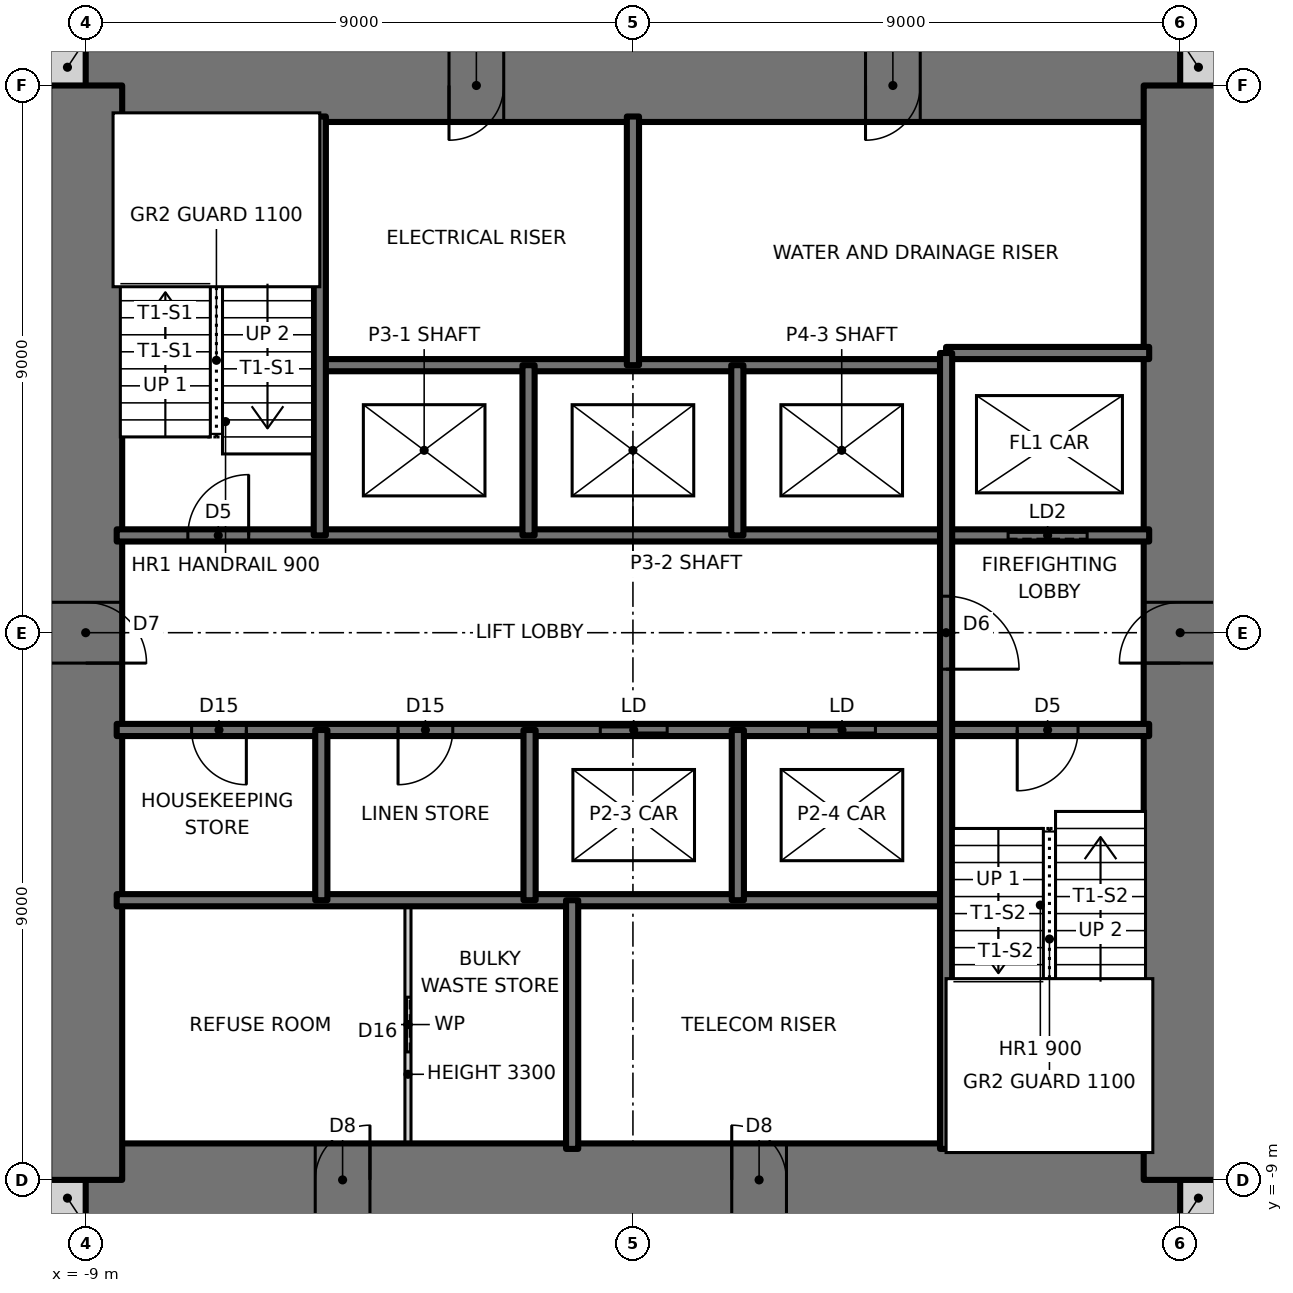
"""IFC4 building model, lengths in metres.
Left out: names, types, materials, properties, quantities, classifications, styles, units other than length and angle.
Written with IfcOpenShell. Run it as: python <this file> out.ifc"""

import sys

from ifc_helpers import new_model, si_unit, direction, frame, frame_2d, origin, place, context, subcontext, project, spatial, rectangle, extrude, element, fill, save


model = new_model("IFC4")
c1 = context("Model", 3, precision=1e-05, world=origin(), true_north=direction((0.0, 1.0)))
c2 = subcontext(c1, "Body", "Model", "MODEL_VIEW")
j1 = project(units=[si_unit("LENGTHUNIT", "METRE"), si_unit("PLANEANGLEUNIT", "RADIAN")], contexts=[c1])
p1 = place(None, origin())
s1 = spatial("IfcSite", under=j1, at=p1, CompositionType="ELEMENT")
p2 = place(p1, origin())
s2 = spatial("IfcBuilding", under=s1, at=p2, CompositionType="ELEMENT")
p3 = place(p2, frame((0.0, 0.0, 101.5)))
s3 = spatial("IfcBuildingStorey", under=s2, at=p3, CompositionType="ELEMENT", Elevation=101.5)
for number, where, z_axis, x_axis in (
    (1, (-9.6, -9.3, 0.0), (0.0, 0.0, 1.0), (1.0, 0.0, 0.0)),
    (2, (9.0, -9.3, 0.0), (0.0, 0.0, 1.0), (1.0, 0.0, 0.0)),
    (3, (9.0, 9.3, 0.0), (0.0, 0.0, 1.0), (1.0, 0.0, 0.0)),
    (4, (-9.6, 9.3, 0.0), (0.0, 0.0, 1.0), (1.0, 0.0, 0.0)),
):
    element("IfcWall", number, at=place(p3, frame(where, z_axis=z_axis, x_axis=x_axis)), inside=s3, PredefinedType="SOLIDWALL", context=c2, shape_type="SweptSolid", body=[
        extrude(rectangle(XDim=0.6, YDim=0.6, at=frame_2d((0.3, 0.0))), origin(), (0.0, 0.0, 1.0), 3.5),
    ])
p4 = place(p3, frame((-9.0, -9.0, 0.0), z_axis=(0.0, 0.0, 1.0), x_axis=(1.0, 0.0, 0.0)))
e5 = element("IfcWall", 5, at=p4, inside=s3, PredefinedType="SHEAR", context=c2, shape_type="SweptSolid", body=[
    extrude(rectangle(XDim=18.0, YDim=1.2, at=frame_2d((9.0, 0.0))), origin(), (0.0, 0.0, 1.0), 3.5),
])
p5 = place(p4, frame((3.775, 0.0, 0.0)))
e6 = element("IfcOpeningElement", 6, at=p5, cuts=e5, PredefinedType="OPENING", context=c2, shape_type="SweptSolid", body=[
    extrude(rectangle(XDim=0.9, YDim=2.1, at=frame_2d((0.45, 1.05))), frame((0.0, 0.61, 0.0), z_axis=(0.0, -1.0, 0.0), x_axis=(1.0, 0.0, 0.0)), (0.0, 0.0, 1.0), 1.22),
])
p6 = place(p4, frame((10.625, 0.0, 0.0)))
e7 = element("IfcOpeningElement", 7, at=p6, cuts=e5, PredefinedType="OPENING", context=c2, shape_type="SweptSolid", body=[
    extrude(rectangle(XDim=0.9, YDim=2.1, at=frame_2d((0.45, 1.05))), frame((0.0, 0.61, 0.0), z_axis=(0.0, -1.0, 0.0), x_axis=(1.0, 0.0, 0.0)), (0.0, 0.0, 1.0), 1.22),
])
p7 = place(p3, frame((9.0, 9.0, 0.0), z_axis=(0.0, 0.0, 1.0), x_axis=(-1.0, 0.0, 0.0)))
e8 = element("IfcWall", 8, at=p7, inside=s3, PredefinedType="SHEAR", context=c2, shape_type="SweptSolid", body=[
    extrude(rectangle(XDim=18.0, YDim=1.2, at=frame_2d((9.0, 0.0))), origin(), (0.0, 0.0, 1.0), 3.5),
])
p8 = place(p7, frame((11.125, 0.0, 0.0)))
e9 = element("IfcOpeningElement", 9, at=p8, cuts=e8, PredefinedType="OPENING", context=c2, shape_type="SweptSolid", body=[
    extrude(rectangle(XDim=0.9, YDim=2.1, at=frame_2d((0.45, 1.05))), frame((0.0, 0.61, 0.0), z_axis=(0.0, -1.0, 0.0), x_axis=(1.0, 0.0, 0.0)), (0.0, 0.0, 1.0), 1.22),
])
p9 = place(p7, frame((4.275, 0.0, 0.0)))
e10 = element("IfcOpeningElement", 10, at=p9, cuts=e8, PredefinedType="OPENING", context=c2, shape_type="SweptSolid", body=[
    extrude(rectangle(XDim=0.9, YDim=2.1, at=frame_2d((0.45, 1.05))), frame((0.0, 0.61, 0.0), z_axis=(0.0, -1.0, 0.0), x_axis=(1.0, 0.0, 0.0)), (0.0, 0.0, 1.0), 1.22),
])
p10 = place(p3, frame((9.0, -9.0, 0.0), z_axis=(0.0, 0.0, 1.0), x_axis=(0.0, 1.0, 0.0)))
e11 = element("IfcWall", 11, at=p10, inside=s3, PredefinedType="SHEAR", context=c2, shape_type="SweptSolid", body=[
    extrude(rectangle(XDim=18.0, YDim=1.2, at=frame_2d((9.0, 0.0))), origin(), (0.0, 0.0, 1.0), 3.5),
])
p11 = place(p10, frame((8.5, 0.0, 0.0)))
e12 = element("IfcOpeningElement", 12, at=p11, cuts=e11, PredefinedType="OPENING", context=c2, shape_type="SweptSolid", body=[
    extrude(rectangle(XDim=1.0, YDim=2.1, at=frame_2d((0.5, 1.05))), frame((0.0, 0.61, 0.0), z_axis=(0.0, -1.0, 0.0), x_axis=(1.0, 0.0, 0.0)), (0.0, 0.0, 1.0), 1.22),
])
p12 = place(p3, frame((-9.0, 9.0, 0.0), z_axis=(0.0, 0.0, 1.0), x_axis=(0.0, -1.0, 0.0)))
e13 = element("IfcWall", 13, at=p12, inside=s3, PredefinedType="SHEAR", context=c2, shape_type="SweptSolid", body=[
    extrude(rectangle(XDim=18.0, YDim=1.2, at=frame_2d((9.0, 0.0))), origin(), (0.0, 0.0, 1.0), 3.5),
])
p13 = place(p12, frame((8.5, 0.0, 0.0)))
e14 = element("IfcOpeningElement", 14, at=p13, cuts=e13, PredefinedType="OPENING", context=c2, shape_type="SweptSolid", body=[
    extrude(rectangle(XDim=1.0, YDim=2.1, at=frame_2d((0.5, 1.05))), frame((0.0, 0.61, 0.0), z_axis=(0.0, -1.0, 0.0), x_axis=(1.0, 0.0, 0.0)), (0.0, 0.0, 1.0), 1.22),
])
p14 = place(p3, frame((-8.49, -4.4, 0.0), z_axis=(0.0, 0.0, 1.0), x_axis=(1.0, 0.0, 0.0)))
e15 = element("IfcWall", 15, at=p14, inside=s3, PredefinedType="SOLIDWALL", context=c2, shape_type="SweptSolid", body=[
    extrude(rectangle(XDim=13.64, YDim=0.2, at=frame_2d((6.82, 0.0))), origin(), (0.0, 0.0, 1.0), 3.5),
])
p15 = place(p3, frame((-8.49, -1.6, 0.0), z_axis=(0.0, 0.0, 1.0), x_axis=(1.0, 0.0, 0.0)))
e16 = element("IfcWall", 16, at=p15, inside=s3, PredefinedType="SOLIDWALL", context=c2, shape_type="SweptSolid", body=[
    extrude(rectangle(XDim=16.98, YDim=0.2, at=frame_2d((8.49, 0.0))), origin(), (0.0, 0.0, 1.0), 3.5),
])
p16 = place(p15, frame((14.81, 0.0, 0.0)))
e17 = element("IfcOpeningElement", 17, at=p16, cuts=e16, PredefinedType="OPENING", context=c2, shape_type="SweptSolid", body=[
    extrude(rectangle(XDim=1.0, YDim=2.1, at=frame_2d((0.5, 1.05))), frame((0.0, 0.11, 0.0), z_axis=(0.0, -1.0, 0.0), x_axis=(1.0, 0.0, 0.0)), (0.0, 0.0, 1.0), 0.22),
])
p17 = place(p15, frame((1.232, 0.0, 0.0)))
e18 = element("IfcOpeningElement", 18, at=p17, cuts=e16, PredefinedType="OPENING", context=c2, shape_type="SweptSolid", body=[
    extrude(rectangle(XDim=0.9, YDim=2.1, at=frame_2d((0.45, 1.05))), frame((0.0, 0.11, 0.0), z_axis=(0.0, -1.0, 0.0), x_axis=(1.0, 0.0, 0.0)), (0.0, 0.0, 1.0), 0.22),
])
p18 = place(p15, frame((4.627, 0.0, 0.0)))
e19 = element("IfcOpeningElement", 19, at=p18, cuts=e16, PredefinedType="OPENING", context=c2, shape_type="SweptSolid", body=[
    extrude(rectangle(XDim=0.9, YDim=2.1, at=frame_2d((0.45, 1.05))), frame((0.0, 0.11, 0.0), z_axis=(0.0, -1.0, 0.0), x_axis=(1.0, 0.0, 0.0)), (0.0, 0.0, 1.0), 0.22),
])
p19 = place(p15, frame((7.953, 0.0, 0.0)))
e20 = element("IfcOpeningElement", 20, at=p19, cuts=e16, PredefinedType="OPENING", context=c2, shape_type="SweptSolid", body=[
    extrude(rectangle(XDim=1.1, YDim=2.1, at=frame_2d((0.55, 1.05))), frame((0.0, 0.11, 0.0), z_axis=(0.0, -1.0, 0.0), x_axis=(1.0, 0.0, 0.0)), (0.0, 0.0, 1.0), 0.22),
])
p20 = place(p15, frame((11.378, 0.0, 0.0)))
e21 = element("IfcOpeningElement", 21, at=p20, cuts=e16, PredefinedType="OPENING", context=c2, shape_type="SweptSolid", body=[
    extrude(rectangle(XDim=1.1, YDim=2.1, at=frame_2d((0.55, 1.05))), frame((0.0, 0.11, 0.0), z_axis=(0.0, -1.0, 0.0), x_axis=(1.0, 0.0, 0.0)), (0.0, 0.0, 1.0), 0.22),
])
p21 = place(p3, frame((-8.49, 1.6, 0.0), z_axis=(0.0, 0.0, 1.0), x_axis=(1.0, 0.0, 0.0)))
e22 = element("IfcWall", 22, at=p21, inside=s3, PredefinedType="SOLIDWALL", context=c2, shape_type="SweptSolid", body=[
    extrude(rectangle(XDim=16.98, YDim=0.2, at=frame_2d((8.49, 0.0))), origin(), (0.0, 0.0, 1.0), 3.5),
])
p22 = place(p21, frame((1.17, 0.0, 0.0)))
e23 = element("IfcOpeningElement", 23, at=p22, cuts=e22, PredefinedType="OPENING", context=c2, shape_type="SweptSolid", body=[
    extrude(rectangle(XDim=1.0, YDim=2.1, at=frame_2d((0.5, 1.05))), frame((0.0, 0.11, 0.0), z_axis=(0.0, -1.0, 0.0), x_axis=(1.0, 0.0, 0.0)), (0.0, 0.0, 1.0), 0.22),
])
p23 = place(p21, frame((14.66, 0.0, 0.0)))
e24 = element("IfcOpeningElement", 24, at=p23, cuts=e22, PredefinedType="OPENING", context=c2, shape_type="SweptSolid", body=[
    extrude(rectangle(XDim=1.3, YDim=2.1, at=frame_2d((0.65, 1.05))), frame((0.0, 0.11, 0.0), z_axis=(0.0, -1.0, 0.0), x_axis=(1.0, 0.0, 0.0)), (0.0, 0.0, 1.0), 0.22),
])
p24 = place(p3, frame((-5.15, 4.4, 0.0), z_axis=(0.0, 0.0, 1.0), x_axis=(1.0, 0.0, 0.0)))
e25 = element("IfcWall", 25, at=p24, inside=s3, PredefinedType="SOLIDWALL", context=c2, shape_type="SweptSolid", body=[
    extrude(rectangle(XDim=10.3, YDim=0.2, at=frame_2d((5.15, 0.0))), origin(), (0.0, 0.0, 1.0), 3.5),
])
p25 = place(p3, frame((5.15, 4.6, 0.0), z_axis=(0.0, 0.0, 1.0), x_axis=(1.0, 0.0, 0.0)))
e26 = element("IfcWall", 26, at=p25, inside=s3, PredefinedType="SOLIDWALL", context=c2, shape_type="SweptSolid", body=[
    extrude(rectangle(XDim=3.34, YDim=0.2, at=frame_2d((1.67, 0.0))), origin(), (0.0, 0.0, 1.0), 3.5),
])
p26 = place(p3, frame((5.15, -8.49, 0.0), z_axis=(0.0, 0.0, 1.0), x_axis=(0.0, 1.0, 0.0)))
e27 = element("IfcWall", 27, at=p26, inside=s3, PredefinedType="SOLIDWALL", context=c2, shape_type="SweptSolid", body=[
    extrude(rectangle(XDim=13.09, YDim=0.2, at=frame_2d((6.545, 0.0))), origin(), (0.0, 0.0, 1.0), 3.5),
])
p27 = place(p26, frame((7.89, 0.0, 0.0)))
e28 = element("IfcOpeningElement", 28, at=p27, cuts=e27, PredefinedType="OPENING", context=c2, shape_type="SweptSolid", body=[
    extrude(rectangle(XDim=1.2, YDim=2.1, at=frame_2d((0.6, 1.05))), frame((0.0, 0.11, 0.0), z_axis=(0.0, -1.0, 0.0), x_axis=(1.0, 0.0, 0.0)), (0.0, 0.0, 1.0), 0.22),
])
for number, where, z_axis, x_axis in (
    (29, (1.725, -4.4, 0.0), (0.0, 0.0, 1.0), (0.0, 1.0, 0.0)),
    (30, (1.717, 1.6, 0.0), (0.0, 0.0, 1.0), (0.0, 1.0, 0.0)),
):
    element("IfcWall", number, at=place(p3, frame(where, z_axis=z_axis, x_axis=x_axis)), inside=s3, PredefinedType="SOLIDWALL", context=c2, shape_type="SweptSolid", body=[
        extrude(rectangle(XDim=2.8, YDim=0.2, at=frame_2d((1.4, 0.0))), origin(), (0.0, 0.0, 1.0), 3.5),
    ])
for number, where, z_axis, x_axis in (
    (31, (0.0, 4.4, 0.0), (0.0, 0.0, 1.0), (0.0, 1.0, 0.0)),
    (32, (-1.0, -8.49, 0.0), (0.0, 0.0, 1.0), (0.0, 1.0, 0.0)),
):
    element("IfcWall", number, at=place(p3, frame(where, z_axis=z_axis, x_axis=x_axis)), inside=s3, PredefinedType="SOLIDWALL", context=c2, shape_type="SweptSolid", body=[
        extrude(rectangle(XDim=4.09, YDim=0.2, at=frame_2d((2.045, 0.0))), origin(), (0.0, 0.0, 1.0), 3.5),
    ])
for number, where, z_axis, x_axis in (
    (33, (-1.7, -4.4, 0.0), (0.0, 0.0, 1.0), (0.0, 1.0, 0.0)),
    (34, (-1.717, 1.6, 0.0), (0.0, 0.0, 1.0), (0.0, 1.0, 0.0)),
):
    element("IfcWall", number, at=place(p3, frame(where, z_axis=z_axis, x_axis=x_axis)), inside=s3, PredefinedType="SOLIDWALL", context=c2, shape_type="SweptSolid", body=[
        extrude(rectangle(XDim=2.8, YDim=0.2, at=frame_2d((1.4, 0.0))), origin(), (0.0, 0.0, 1.0), 3.5),
    ])
p28 = place(p3, frame((-3.7, -8.49, 0.0), z_axis=(0.0, 0.0, 1.0), x_axis=(0.0, 1.0, 0.0)))
e35 = element("IfcWall", 35, at=p28, inside=s3, PredefinedType="PARTITIONING", context=c2, shape_type="SweptSolid", body=[
    extrude(rectangle(XDim=4.09, YDim=0.1, at=frame_2d((2.045, 0.0))), origin(), (0.0, 0.0, 1.0), 3.3),
])
p29 = place(p28, frame((1.595, 0.0, 0.0)))
e36 = element("IfcOpeningElement", 36, at=p29, cuts=e35, PredefinedType="OPENING", context=c2, shape_type="SweptSolid", body=[
    extrude(rectangle(XDim=0.9, YDim=2.1, at=frame_2d((0.45, 1.05))), frame((0.0, 0.06, 0.0), z_axis=(0.0, -1.0, 0.0), x_axis=(1.0, 0.0, 0.0)), (0.0, 0.0, 1.0), 0.12),
])
p30 = place(p3, frame((-5.125, -4.4, 0.0), z_axis=(0.0, 0.0, 1.0), x_axis=(0.0, 1.0, 0.0)))
e37 = element("IfcWall", 37, at=p30, inside=s3, PredefinedType="SOLIDWALL", context=c2, shape_type="SweptSolid", body=[
    extrude(rectangle(XDim=2.8, YDim=0.2, at=frame_2d((1.4, 0.0))), origin(), (0.0, 0.0, 1.0), 3.5),
])
p31 = place(p3, frame((-5.15, 1.6, 0.0), z_axis=(0.0, 0.0, 1.0), x_axis=(0.0, 1.0, 0.0)))
e38 = element("IfcWall", 38, at=p31, inside=s3, PredefinedType="SOLIDWALL", context=c2, shape_type="SweptSolid", body=[
    extrude(rectangle(XDim=6.89, YDim=0.2, at=frame_2d((3.445, 0.0))), origin(), (0.0, 0.0, 1.0), 3.5),
])
p32 = place(p22, origin())
e39 = element("IfcDoor", 39, at=p32, inside=s3, OperationType="SINGLE_SWING_RIGHT", PredefinedType="DOOR", context=c2, shape_type="SweptSolid", body=[
    extrude(rectangle(XDim=1.0, YDim=2.1, at=frame_2d((0.5, 1.05))), frame((0.0, 0.025, 0.0), z_axis=(0.0, -1.0, 0.0), x_axis=(1.0, 0.0, 0.0)), (0.0, 0.0, 1.0), 0.05),
])
fill(e23, e39)
p33 = place(p16, frame((1.0, 0.0, 0.0), z_axis=(0.0, 0.0, 1.0), x_axis=(-1.0, 0.0, 0.0)))
e40 = element("IfcDoor", 40, at=p33, inside=s3, OperationType="SINGLE_SWING_RIGHT", PredefinedType="DOOR", context=c2, shape_type="SweptSolid", body=[
    extrude(rectangle(XDim=1.0, YDim=2.1, at=frame_2d((0.5, 1.05))), frame((0.0, 0.025, 0.0), z_axis=(0.0, -1.0, 0.0), x_axis=(1.0, 0.0, 0.0)), (0.0, 0.0, 1.0), 0.05),
])
fill(e17, e40)
p34 = place(p27, frame((1.2, 0.0, 0.0), z_axis=(0.0, 0.0, 1.0), x_axis=(-1.0, 0.0, 0.0)))
e41 = element("IfcDoor", 41, at=p34, inside=s3, OperationType="SINGLE_SWING_RIGHT", PredefinedType="DOOR", context=c2, shape_type="SweptSolid", body=[
    extrude(rectangle(XDim=1.2, YDim=2.1, at=frame_2d((0.6, 1.05))), frame((0.0, 0.025, 0.0), z_axis=(0.0, -1.0, 0.0), x_axis=(1.0, 0.0, 0.0)), (0.0, 0.0, 1.0), 0.05),
])
fill(e28, e41)
p35 = place(p17, frame((0.9, 0.0, 0.0), z_axis=(0.0, 0.0, 1.0), x_axis=(-1.0, 0.0, 0.0)))
e42 = element("IfcDoor", 42, at=p35, inside=s3, OperationType="SINGLE_SWING_LEFT", PredefinedType="DOOR", context=c2, shape_type="SweptSolid", body=[
    extrude(rectangle(XDim=0.9, YDim=2.1, at=frame_2d((0.45, 1.05))), frame((0.0, 0.025, 0.0), z_axis=(0.0, -1.0, 0.0), x_axis=(1.0, 0.0, 0.0)), (0.0, 0.0, 1.0), 0.05),
])
fill(e18, e42)
p36 = place(p18, frame((0.9, 0.0, 0.0), z_axis=(0.0, 0.0, 1.0), x_axis=(-1.0, 0.0, 0.0)))
e43 = element("IfcDoor", 43, at=p36, inside=s3, OperationType="SINGLE_SWING_RIGHT", PredefinedType="DOOR", context=c2, shape_type="SweptSolid", body=[
    extrude(rectangle(XDim=0.9, YDim=2.1, at=frame_2d((0.45, 1.05))), frame((0.0, 0.025, 0.0), z_axis=(0.0, -1.0, 0.0), x_axis=(1.0, 0.0, 0.0)), (0.0, 0.0, 1.0), 0.05),
])
fill(e19, e43)
p37 = place(p29, origin())
e44 = element("IfcDoor", 44, at=p37, inside=s3, OperationType="SLIDING_TO_LEFT", PredefinedType="DOOR", context=c2, shape_type="SweptSolid", body=[
    extrude(rectangle(XDim=0.9, YDim=2.1, at=frame_2d((0.45, 1.05))), frame((0.0, 0.025, 0.0), z_axis=(0.0, -1.0, 0.0), x_axis=(1.0, 0.0, 0.0)), (0.0, 0.0, 1.0), 0.05),
])
fill(e36, e44)
p38 = place(p13, origin())
e45 = element("IfcDoor", 45, at=p38, inside=s3, OperationType="SINGLE_SWING_RIGHT", PredefinedType="DOOR", context=c2, shape_type="SweptSolid", body=[
    extrude(rectangle(XDim=1.0, YDim=2.1, at=frame_2d((0.5, 1.05))), frame((0.0, 0.025, 0.0), z_axis=(0.0, -1.0, 0.0), x_axis=(1.0, 0.0, 0.0)), (0.0, 0.0, 1.0), 0.05),
])
fill(e14, e45)
p39 = place(p11, origin())
e46 = element("IfcDoor", 46, at=p39, inside=s3, OperationType="SINGLE_SWING_LEFT", PredefinedType="DOOR", context=c2, shape_type="SweptSolid", body=[
    extrude(rectangle(XDim=1.0, YDim=2.1, at=frame_2d((0.5, 1.05))), frame((0.0, 0.025, 0.0), z_axis=(0.0, -1.0, 0.0), x_axis=(1.0, 0.0, 0.0)), (0.0, 0.0, 1.0), 0.05),
])
fill(e12, e46)
p40 = place(p8, origin())
e47 = element("IfcDoor", 47, at=p40, inside=s3, OperationType="SINGLE_SWING_RIGHT", PredefinedType="DOOR", context=c2, shape_type="SweptSolid", body=[
    extrude(rectangle(XDim=0.9, YDim=2.1, at=frame_2d((0.45, 1.05))), frame((0.0, 0.025, 0.0), z_axis=(0.0, -1.0, 0.0), x_axis=(1.0, 0.0, 0.0)), (0.0, 0.0, 1.0), 0.05),
])
fill(e9, e47)
p41 = place(p9, origin())
e48 = element("IfcDoor", 48, at=p41, inside=s3, OperationType="SINGLE_SWING_RIGHT", PredefinedType="DOOR", context=c2, shape_type="SweptSolid", body=[
    extrude(rectangle(XDim=0.9, YDim=2.1, at=frame_2d((0.45, 1.05))), frame((0.0, 0.025, 0.0), z_axis=(0.0, -1.0, 0.0), x_axis=(1.0, 0.0, 0.0)), (0.0, 0.0, 1.0), 0.05),
])
fill(e10, e48)
p42 = place(p5, origin())
e49 = element("IfcDoor", 49, at=p42, inside=s3, OperationType="SINGLE_SWING_RIGHT", PredefinedType="DOOR", context=c2, shape_type="SweptSolid", body=[
    extrude(rectangle(XDim=0.9, YDim=2.1, at=frame_2d((0.45, 1.05))), frame((0.0, 0.025, 0.0), z_axis=(0.0, -1.0, 0.0), x_axis=(1.0, 0.0, 0.0)), (0.0, 0.0, 1.0), 0.05),
])
fill(e6, e49)
p43 = place(p6, origin())
e50 = element("IfcDoor", 50, at=p43, inside=s3, OperationType="SINGLE_SWING_LEFT", PredefinedType="DOOR", context=c2, shape_type="SweptSolid", body=[
    extrude(rectangle(XDim=0.9, YDim=2.1, at=frame_2d((0.45, 1.05))), frame((0.0, 0.025, 0.0), z_axis=(0.0, -1.0, 0.0), x_axis=(1.0, 0.0, 0.0)), (0.0, 0.0, 1.0), 0.05),
])
fill(e7, e50)
p44 = place(p19, origin())
e51 = element("IfcDoor", 51, at=p44, inside=s3, OperationType="DOUBLE_DOOR_SLIDING", PredefinedType="DOOR", context=c2, shape_type="SweptSolid", body=[
    extrude(rectangle(XDim=1.1, YDim=2.1, at=frame_2d((0.55, 1.05))), frame((0.0, 0.025, 0.0), z_axis=(0.0, -1.0, 0.0), x_axis=(1.0, 0.0, 0.0)), (0.0, 0.0, 1.0), 0.05),
])
fill(e20, e51)
p45 = place(p20, origin())
e52 = element("IfcDoor", 52, at=p45, inside=s3, OperationType="DOUBLE_DOOR_SLIDING", PredefinedType="DOOR", context=c2, shape_type="SweptSolid", body=[
    extrude(rectangle(XDim=1.1, YDim=2.1, at=frame_2d((0.55, 1.05))), frame((0.0, 0.025, 0.0), z_axis=(0.0, -1.0, 0.0), x_axis=(1.0, 0.0, 0.0)), (0.0, 0.0, 1.0), 0.05),
])
fill(e21, e52)
p46 = place(p23, origin())
e53 = element("IfcDoor", 53, at=p46, inside=s3, OperationType="SLIDING_TO_LEFT", PredefinedType="DOOR", context=c2, shape_type="SweptSolid", body=[
    extrude(rectangle(XDim=1.3, YDim=2.1, at=frame_2d((0.65, 1.05))), frame((0.0, 0.025, 0.0), z_axis=(0.0, -1.0, 0.0), x_axis=(1.0, 0.0, 0.0)), (0.0, 0.0, 1.0), 0.05),
])
fill(e24, e53)
save(model, sys.argv[1])
